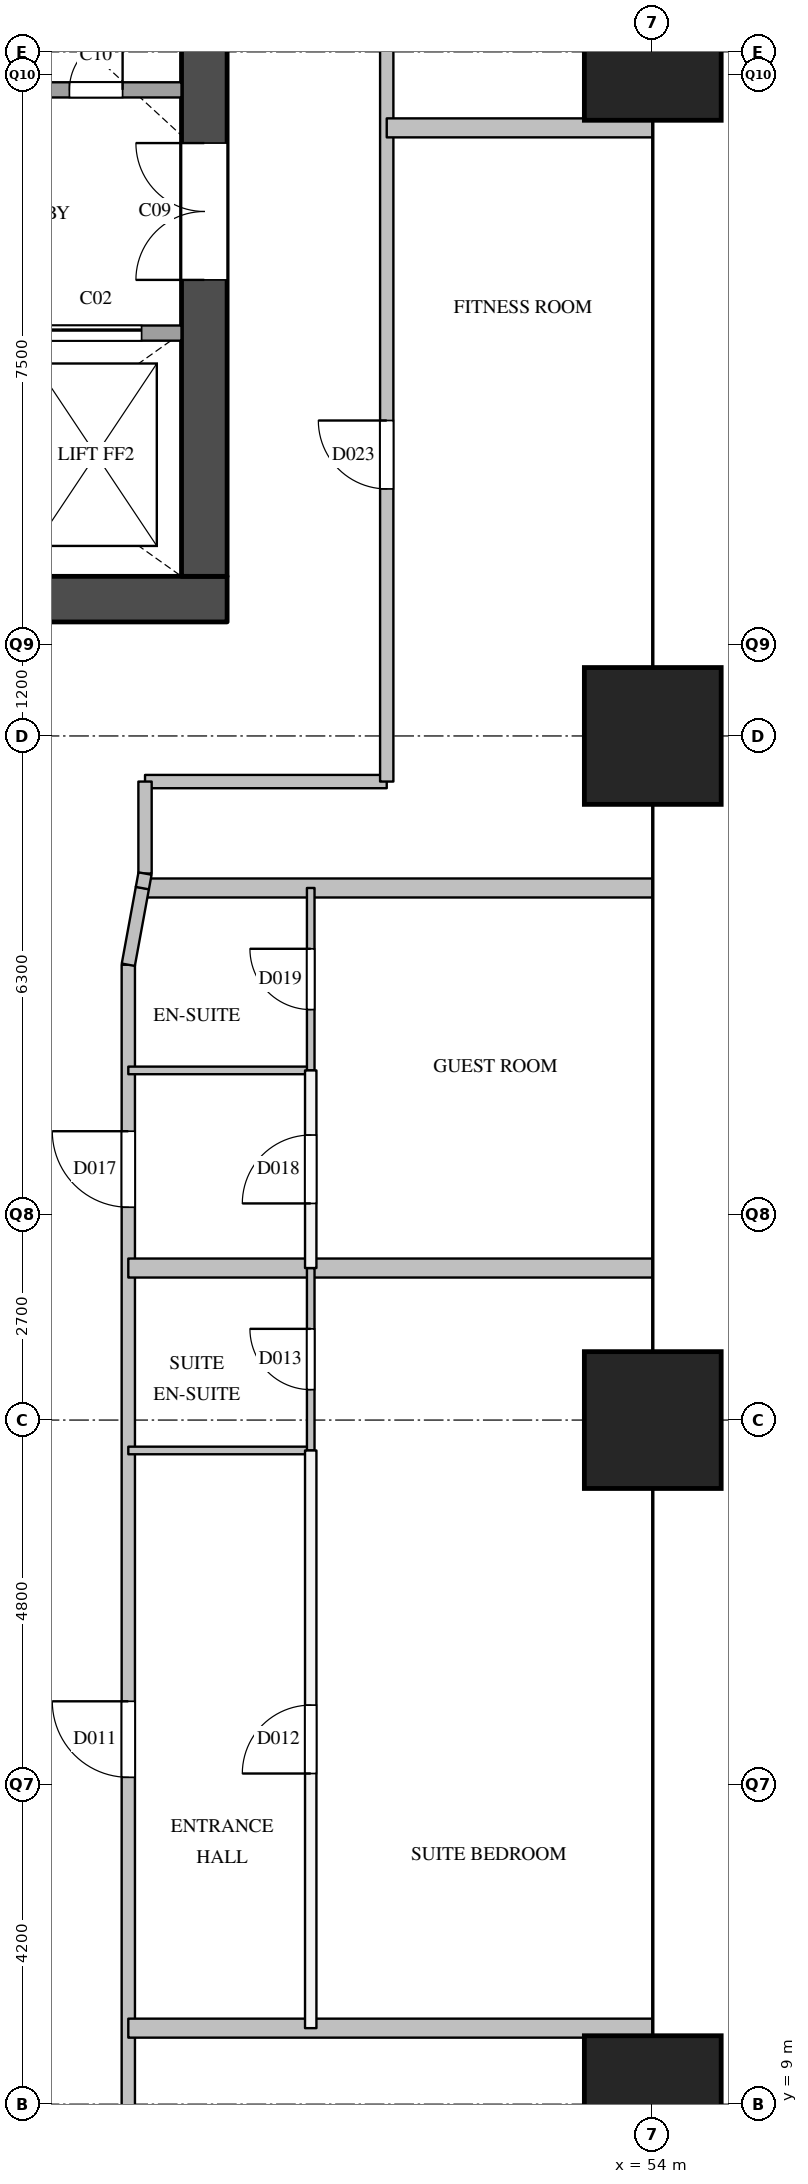
"""IFC4 building model, lengths in metres.
Left out: names, types, materials, properties, quantities, classifications, styles, units other than length and angle.
Written with IfcOpenShell. Run it as: python <this file> out.ifc"""

import sys

from ifc_helpers import new_model, si_unit, direction, frame, frame_2d, origin, origin_2d, place, context, subcontext, project, spatial, rectangle, extrude, element, fill, save


model = new_model("IFC4")
c1 = context("Model", 3, precision=1e-05, world=origin(), true_north=direction((0.0, 1.0)))
c2 = subcontext(c1, "Body", "Model", "MODEL_VIEW")
j1 = project(units=[si_unit("LENGTHUNIT", "METRE"), si_unit("PLANEANGLEUNIT", "RADIAN")], contexts=[c1])
p1 = place(None, origin())
s1 = spatial("IfcSite", under=j1, at=p1, CompositionType="ELEMENT")
p2 = place(p1, origin())
s2 = spatial("IfcBuilding", under=s1, at=p2, CompositionType="ELEMENT")
p3 = place(p2, frame((0.0, 0.0, 85.4)))
s3 = spatial("IfcBuildingStorey", under=s2, at=p3, CompositionType="ELEMENT", Elevation=85.4)
for number, where, z_axis, x_axis in (
    (1, (54.0, 9.0, 0.0), (0.0, 0.0, 1.0), (1.0, 0.0, 0.0)),
    (2, (54.0, 18.0, 0.0), (0.0, 0.0, 1.0), (1.0, 0.0, 0.0)),
    (3, (54.0, 27.0, 0.0), (0.0, 0.0, 1.0), (1.0, 0.0, 0.0)),
    (4, (54.0, 36.0, 0.0), (0.0, 0.0, 1.0), (1.0, 0.0, 0.0)),
):
    element("IfcColumn", number, at=place(p3, frame(where, z_axis=z_axis, x_axis=x_axis)), inside=s3, PredefinedType="COLUMN", context=c2, shape_type="SweptSolid", body=[
        extrude(rectangle(XDim=1.8, YDim=1.8, at=origin_2d()), origin(), (0.0, 0.0, 1.0), 3.8),
    ])
p4 = place(p3, frame((36.0, 28.8, 0.0), z_axis=(0.0, 0.0, 1.0), x_axis=(1.0, 0.0, 0.0)))
e5 = element("IfcWall", 5, at=p4, inside=s3, PredefinedType="SHEAR", context=c2, shape_type="SweptSolid", body=[
    extrude(rectangle(XDim=12.4, YDim=0.6, at=frame_2d((6.2, 0.0))), origin(), (0.0, 0.0, 1.0), 3.5),
])
p5 = place(p3, frame((48.1, 29.1, 0.0), z_axis=(0.0, 0.0, 1.0), x_axis=(0.0, 1.0, 0.0)))
e6 = element("IfcWall", 6, at=p5, inside=s3, PredefinedType="SHEAR", context=c2, shape_type="SweptSolid", body=[
    extrude(rectangle(XDim=20.3, YDim=0.6, at=frame_2d((10.15, 0.0))), origin(), (0.0, 0.0, 1.0), 3.5),
])
p6 = place(p5, frame((12.5, 0.0, 0.0)))
e7 = element("IfcOpeningElement", 7, at=p6, cuts=e6, PredefinedType="OPENING", context=c2, shape_type="SweptSolid", body=[
    extrude(rectangle(XDim=0.7, YDim=2.1, at=frame_2d((0.35, 1.05))), frame((0.0, 0.31, 0.0), z_axis=(0.0, -1.0, 0.0), x_axis=(1.0, 0.0, 0.0)), (0.0, 0.0, 1.0), 0.62),
])
p7 = place(p5, frame((3.9, 0.0, 0.0)))
e8 = element("IfcOpeningElement", 8, at=p7, cuts=e6, PredefinedType="OPENING", context=c2, shape_type="SweptSolid", body=[
    extrude(rectangle(XDim=1.8, YDim=2.1, at=frame_2d((0.9, 1.05))), frame((0.0, 0.31, 0.0), z_axis=(0.0, -1.0, 0.0), x_axis=(1.0, 0.0, 0.0)), (0.0, 0.0, 1.0), 0.62),
])
p8 = place(p3, frame((36.6, 32.3, 0.0), z_axis=(0.0, 0.0, 1.0), x_axis=(1.0, 0.0, 0.0)))
e9 = element("IfcWall", 9, at=p8, inside=s3, PredefinedType="SOLIDWALL", context=c2, shape_type="SweptSolid", body=[
    extrude(rectangle(XDim=11.2, YDim=0.2, at=frame_2d((5.6, 0.0))), origin(), (0.0, 0.0, 1.0), 3.5),
])
p9 = place(p8, frame((7.225, 0.0, 0.0)))
e10 = element("IfcOpeningElement", 10, at=p9, cuts=e9, PredefinedType="OPENING", context=c2, shape_type="SweptSolid", body=[
    extrude(rectangle(XDim=1.2, YDim=2.1, at=frame_2d((0.6, 1.05))), frame((0.0, 0.11, 0.0), z_axis=(0.0, -1.0, 0.0), x_axis=(1.0, 0.0, 0.0)), (0.0, 0.0, 1.0), 0.22),
])
p10 = place(p8, frame((9.475, 0.0, 0.0)))
e11 = element("IfcOpeningElement", 11, at=p10, cuts=e9, PredefinedType="OPENING", context=c2, shape_type="SweptSolid", body=[
    extrude(rectangle(XDim=1.2, YDim=2.1, at=frame_2d((0.6, 1.05))), frame((0.0, 0.11, 0.0), z_axis=(0.0, -1.0, 0.0), x_axis=(1.0, 0.0, 0.0)), (0.0, 0.0, 1.0), 0.22),
])
p11 = place(p3, frame((43.3, 35.5, 0.0), z_axis=(0.0, 0.0, 1.0), x_axis=(1.0, 0.0, 0.0)))
e12 = element("IfcWall", 12, at=p11, inside=s3, PredefinedType="SOLIDWALL", context=c2, shape_type="SweptSolid", body=[
    extrude(rectangle(XDim=4.5, YDim=0.2, at=frame_2d((2.25, 0.0))), origin(), (0.0, 0.0, 1.0), 3.5),
])
p12 = place(p11, frame((0.525, 0.0, 0.0)))
e13 = element("IfcOpeningElement", 13, at=p12, cuts=e12, PredefinedType="OPENING", context=c2, shape_type="SweptSolid", body=[
    extrude(rectangle(XDim=1.2, YDim=2.1, at=frame_2d((0.6, 1.05))), frame((0.0, 0.11, 0.0), z_axis=(0.0, -1.0, 0.0), x_axis=(1.0, 0.0, 0.0)), (0.0, 0.0, 1.0), 0.22),
])
p13 = place(p11, frame((3.025, 0.0, 0.0)))
e14 = element("IfcOpeningElement", 14, at=p13, cuts=e12, PredefinedType="OPENING", context=c2, shape_type="SweptSolid", body=[
    extrude(rectangle(XDim=0.7, YDim=2.1, at=frame_2d((0.35, 1.05))), frame((0.0, 0.11, 0.0), z_axis=(0.0, -1.0, 0.0), x_axis=(1.0, 0.0, 0.0)), (0.0, 0.0, 1.0), 0.22),
])
p14 = place(p3, frame((47.32, 26.4, 0.0), z_axis=(0.0, 0.0, 1.0), x_axis=(1.0, 0.0, 0.0)))
e15 = element("IfcWall", 15, at=p14, inside=s3, PredefinedType="PARTITIONING", context=c2, shape_type="SweptSolid", body=[
    extrude(rectangle(XDim=3.18, YDim=0.175, at=frame_2d((1.59, 0.0))), origin(), (0.0, 0.0, 1.0), 3.5),
])
p15 = place(p3, frame((47.1, 6.9, 0.0), z_axis=(0.0, 0.0, 1.0), x_axis=(0.0, 1.0, 0.0)))
e16 = element("IfcWall", 16, at=p15, inside=s3, PredefinedType="PARTITIONING", context=c2, shape_type="SweptSolid", body=[
    extrude(rectangle(XDim=17.09, YDim=0.175, at=frame_2d((8.545, 0.0))), origin(), (0.0, 0.0, 1.0), 3.5),
])
p16 = place(p15, frame((6.4, 0.0, 0.0)))
e17 = element("IfcOpeningElement", 17, at=p16, cuts=e16, PredefinedType="OPENING", context=c2, shape_type="SweptSolid", body=[
    extrude(rectangle(XDim=1.0, YDim=2.1, at=frame_2d((0.5, 1.05))), frame((0.0, 0.097, 0.0), z_axis=(0.0, -1.0, 0.0), x_axis=(1.0, 0.0, 0.0)), (0.0, 0.0, 1.0), 0.195),
])
p17 = place(p15, frame((13.9, 0.0, 0.0)))
e18 = element("IfcOpeningElement", 18, at=p17, cuts=e16, PredefinedType="OPENING", context=c2, shape_type="SweptSolid", body=[
    extrude(rectangle(XDim=1.0, YDim=2.1, at=frame_2d((0.5, 1.05))), frame((0.0, 0.097, 0.0), z_axis=(0.0, -1.0, 0.0), x_axis=(1.0, 0.0, 0.0)), (0.0, 0.0, 1.0), 0.195),
])
p18 = place(p3, frame((47.32, 25.19, 0.0), z_axis=(0.0, 0.0, 1.0), x_axis=(0.0, 1.0, 0.0)))
e19 = element("IfcWall", 19, at=p18, inside=s3, PredefinedType="PARTITIONING", context=c2, shape_type="SweptSolid", body=[
    extrude(rectangle(XDim=1.21, YDim=0.175, at=frame_2d((0.605, 0.0))), origin(), (0.0, 0.0, 1.0), 3.5),
])
p19 = place(p3, frame((50.5, 26.4, 0.0), z_axis=(0.0, 0.0, 1.0), x_axis=(0.0, 1.0, 0.0)))
e20 = element("IfcWall", 20, at=p19, inside=s3, PredefinedType="PARTITIONING", context=c2, shape_type="SweptSolid", body=[
    extrude(rectangle(XDim=25.7, YDim=0.175, at=frame_2d((12.85, 0.0))), origin(), (0.0, 0.0, 1.0), 2.5),
])
p20 = place(p19, frame((3.85, 0.0, 0.0)))
e21 = element("IfcOpeningElement", 21, at=p20, cuts=e20, PredefinedType="OPENING", context=c2, shape_type="SweptSolid", body=[
    extrude(rectangle(XDim=0.9, YDim=2.1, at=frame_2d((0.45, 1.05))), frame((0.0, 0.097, 0.0), z_axis=(0.0, -1.0, 0.0), x_axis=(1.0, 0.0, 0.0)), (0.0, 0.0, 1.0), 0.195),
])
p21 = place(p19, frame((13.15, 0.0, 0.0)))
e22 = element("IfcOpeningElement", 22, at=p21, cuts=e20, PredefinedType="OPENING", context=c2, shape_type="SweptSolid", body=[
    extrude(rectangle(XDim=0.9, YDim=2.1, at=frame_2d((0.45, 1.05))), frame((0.0, 0.097, 0.0), z_axis=(0.0, -1.0, 0.0), x_axis=(1.0, 0.0, 0.0)), (0.0, 0.0, 1.0), 0.195),
])
p22 = place(p19, frame((21.7, 0.0, 0.0)))
e23 = element("IfcOpeningElement", 23, at=p22, cuts=e20, PredefinedType="OPENING", context=c2, shape_type="SweptSolid", body=[
    extrude(rectangle(XDim=0.9, YDim=2.1, at=frame_2d((0.45, 1.05))), frame((0.0, 0.097, 0.0), z_axis=(0.0, -1.0, 0.0), x_axis=(1.0, 0.0, 0.0)), (0.0, 0.0, 1.0), 0.195),
])
p23 = place(p3, frame((49.5, 10.0, 0.0), z_axis=(0.0, 0.0, 1.0), x_axis=(0.0, 1.0, 0.0)))
e24 = element("IfcWall", 24, at=p23, inside=s3, PredefinedType="PARTITIONING", context=c2, shape_type="SweptSolid", body=[
    extrude(rectangle(XDim=7.6, YDim=0.15, at=frame_2d((3.8, 0.0))), origin(), (0.0, 0.0, 1.0), 3.5),
])
p24 = place(p23, frame((3.35, 0.0, 0.0)))
e25 = element("IfcOpeningElement", 25, at=p24, cuts=e24, PredefinedType="OPENING", context=c2, shape_type="SweptSolid", body=[
    extrude(rectangle(XDim=0.9, YDim=2.1, at=frame_2d((0.45, 1.05))), frame((0.0, 0.085, 0.0), z_axis=(0.0, -1.0, 0.0), x_axis=(1.0, 0.0, 0.0)), (0.0, 0.0, 1.0), 0.17),
])
p25 = place(p3, frame((49.5, 20.0, 0.0), z_axis=(0.0, 0.0, 1.0), x_axis=(0.0, 1.0, 0.0)))
e26 = element("IfcWall", 26, at=p25, inside=s3, PredefinedType="PARTITIONING", context=c2, shape_type="SweptSolid", body=[
    extrude(rectangle(XDim=2.6, YDim=0.15, at=frame_2d((1.3, 0.0))), origin(), (0.0, 0.0, 1.0), 3.5),
])
p26 = place(p25, frame((0.85, 0.0, 0.0)))
e27 = element("IfcOpeningElement", 27, at=p26, cuts=e26, PredefinedType="OPENING", context=c2, shape_type="SweptSolid", body=[
    extrude(rectangle(XDim=0.9, YDim=2.1, at=frame_2d((0.45, 1.05))), frame((0.0, 0.085, 0.0), z_axis=(0.0, -1.0, 0.0), x_axis=(1.0, 0.0, 0.0)), (0.0, 0.0, 1.0), 0.17),
])
for number, where, z_axis, x_axis in (
    (28, (47.1, 10.0, 0.0), (0.0, 0.0, 1.0), (1.0, 0.0, 0.0)),
    (29, (47.1, 20.0, 0.0), (0.0, 0.0, 1.0), (1.0, 0.0, 0.0)),
):
    element("IfcWall", number, at=place(p3, frame(where, z_axis=z_axis, x_axis=x_axis)), inside=s3, PredefinedType="PARTITIONING", context=c2, shape_type="SweptSolid", body=[
        extrude(rectangle(XDim=6.9, YDim=0.25, at=frame_2d((3.45, 0.0))), origin(), (0.0, 0.0, 1.0), 2.5),
    ])
p27 = place(p3, frame((47.303, 25.0, 0.0), z_axis=(0.0, 0.0, 1.0), x_axis=(1.0, 0.0, 0.0)))
e30 = element("IfcWall", 30, at=p27, inside=s3, PredefinedType="PARTITIONING", context=c2, shape_type="SweptSolid", body=[
    extrude(rectangle(XDim=6.697, YDim=0.25, at=frame_2d((3.348, 0.0))), origin(), (0.0, 0.0, 1.0), 2.5),
])
p28 = place(p3, frame((50.5, 35.0, 0.0), z_axis=(0.0, 0.0, 1.0), x_axis=(1.0, 0.0, 0.0)))
e31 = element("IfcWall", 31, at=p28, inside=s3, PredefinedType="PARTITIONING", context=c2, shape_type="SweptSolid", body=[
    extrude(rectangle(XDim=3.5, YDim=0.25, at=frame_2d((1.75, 0.0))), origin(), (0.0, 0.0, 1.0), 2.5),
])
for number, where, z_axis, x_axis in (
    (32, (47.1, 17.6, 0.0), (0.0, 0.0, 1.0), (1.0, 0.0, 0.0)),
    (33, (47.1, 22.6, 0.0), (0.0, 0.0, 1.0), (1.0, 0.0, 0.0)),
):
    element("IfcWall", number, at=place(p3, frame(where, z_axis=z_axis, x_axis=x_axis)), inside=s3, PredefinedType="PARTITIONING", context=c2, shape_type="SweptSolid", body=[
        extrude(rectangle(XDim=2.4, YDim=0.1, at=frame_2d((1.2, 0.0))), origin(), (0.0, 0.0, 1.0), 3.5),
    ])
p29 = place(p3, frame((49.5, 17.6, 0.0), z_axis=(0.0, 0.0, 1.0), x_axis=(0.0, 1.0, 0.0)))
e34 = element("IfcWall", 34, at=p29, inside=s3, PredefinedType="PARTITIONING", context=c2, shape_type="SweptSolid", body=[
    extrude(rectangle(XDim=2.4, YDim=0.1, at=frame_2d((1.2, 0.0))), origin(), (0.0, 0.0, 1.0), 3.5),
])
p30 = place(p29, frame((0.8, 0.0, 0.0)))
e35 = element("IfcOpeningElement", 35, at=p30, cuts=e34, PredefinedType="OPENING", context=c2, shape_type="SweptSolid", body=[
    extrude(rectangle(XDim=0.8, YDim=2.1, at=frame_2d((0.4, 1.05))), frame((0.0, 0.06, 0.0), z_axis=(0.0, -1.0, 0.0), x_axis=(1.0, 0.0, 0.0)), (0.0, 0.0, 1.0), 0.12),
])
p31 = place(p3, frame((49.5, 22.6, 0.0), z_axis=(0.0, 0.0, 1.0), x_axis=(0.0, 1.0, 0.0)))
e36 = element("IfcWall", 36, at=p31, inside=s3, PredefinedType="PARTITIONING", context=c2, shape_type="SweptSolid", body=[
    extrude(rectangle(XDim=2.4, YDim=0.1, at=frame_2d((1.2, 0.0))), origin(), (0.0, 0.0, 1.0), 3.5),
])
p32 = place(p31, frame((0.8, 0.0, 0.0)))
e37 = element("IfcOpeningElement", 37, at=p32, cuts=e36, PredefinedType="OPENING", context=c2, shape_type="SweptSolid", body=[
    extrude(rectangle(XDim=0.8, YDim=2.1, at=frame_2d((0.4, 1.05))), frame((0.0, 0.06, 0.0), z_axis=(0.0, -1.0, 0.0), x_axis=(1.0, 0.0, 0.0)), (0.0, 0.0, 1.0), 0.12),
])
p33 = place(p3, frame((47.285, 25.002, 0.0), z_axis=(0.0, 0.0, 1.0), x_axis=(-0.180117405398, -0.983645119071, 0.0)))
e38 = element("IfcWall", 38, at=p33, inside=s3, PredefinedType="PARTITIONING", context=c2, shape_type="SweptSolid", body=[
    extrude(rectangle(XDim=1.029, YDim=0.175, at=frame_2d((0.514, 0.0))), origin(), (0.0, 0.0, 1.0), 3.5),
])
p34 = place(p3, frame((47.32, 25.19, 0.0), z_axis=(0.0, 0.0, 1.0), x_axis=(-0.180206793317, -0.983628746856, 0.0)))
e39 = element("IfcWall", 39, at=p34, inside=s3, PredefinedType="PARTITIONING", context=c2, shape_type="SweptSolid", body=[
    extrude(rectangle(XDim=0.195, YDim=0.175, at=frame_2d((0.098, 0.0))), origin(), (0.0, 0.0, 1.0), 3.5),
])
p35 = place(p10, origin())
e40 = element("IfcDoor", 40, at=p35, inside=s3, OperationType="SLIDING_TO_LEFT", PredefinedType="DOOR", context=c2, shape_type="SweptSolid", body=[
    extrude(rectangle(XDim=1.2, YDim=2.1, at=frame_2d((0.6, 1.05))), frame((0.0, 0.025, 0.0), z_axis=(0.0, -1.0, 0.0), x_axis=(1.0, 0.0, 0.0)), (0.0, 0.0, 1.0), 0.05),
])
fill(e11, e40)
p36 = place(p7, origin())
e41 = element("IfcDoor", 41, at=p36, inside=s3, OperationType="DOUBLE_DOOR_SINGLE_SWING", PredefinedType="DOOR", context=c2, shape_type="SweptSolid", body=[
    extrude(rectangle(XDim=1.8, YDim=2.1, at=frame_2d((0.9, 1.05))), frame((0.0, 0.025, 0.0), z_axis=(0.0, -1.0, 0.0), x_axis=(1.0, 0.0, 0.0)), (0.0, 0.0, 1.0), 0.05),
])
fill(e8, e41)
p37 = place(p13, origin())
e42 = element("IfcDoor", 42, at=p37, inside=s3, OperationType="SINGLE_SWING_RIGHT", PredefinedType="DOOR", context=c2, shape_type="SweptSolid", body=[
    extrude(rectangle(XDim=0.7, YDim=2.1, at=frame_2d((0.35, 1.05))), frame((0.0, 0.025, 0.0), z_axis=(0.0, -1.0, 0.0), x_axis=(1.0, 0.0, 0.0)), (0.0, 0.0, 1.0), 0.05),
])
fill(e14, e42)
p38 = place(p16, origin())
e43 = element("IfcDoor", 43, at=p38, inside=s3, OperationType="SINGLE_SWING_RIGHT", PredefinedType="DOOR", context=c2, shape_type="SweptSolid", body=[
    extrude(rectangle(XDim=1.0, YDim=2.1, at=frame_2d((0.5, 1.05))), frame((0.0, 0.025, 0.0), z_axis=(0.0, -1.0, 0.0), x_axis=(1.0, 0.0, 0.0)), (0.0, 0.0, 1.0), 0.05),
])
fill(e17, e43)
p39 = place(p24, origin())
e44 = element("IfcDoor", 44, at=p39, inside=s3, OperationType="SINGLE_SWING_LEFT", PredefinedType="DOOR", context=c2, shape_type="SweptSolid", body=[
    extrude(rectangle(XDim=0.9, YDim=2.1, at=frame_2d((0.45, 1.05))), frame((0.0, 0.025, 0.0), z_axis=(0.0, -1.0, 0.0), x_axis=(1.0, 0.0, 0.0)), (0.0, 0.0, 1.0), 0.05),
])
fill(e25, e44)
p40 = place(p30, origin())
e45 = element("IfcDoor", 45, at=p40, inside=s3, OperationType="SINGLE_SWING_RIGHT", PredefinedType="DOOR", context=c2, shape_type="SweptSolid", body=[
    extrude(rectangle(XDim=0.8, YDim=2.1, at=frame_2d((0.4, 1.05))), frame((0.0, 0.025, 0.0), z_axis=(0.0, -1.0, 0.0), x_axis=(1.0, 0.0, 0.0)), (0.0, 0.0, 1.0), 0.05),
])
fill(e35, e45)
p41 = place(p17, origin())
e46 = element("IfcDoor", 46, at=p41, inside=s3, OperationType="SINGLE_SWING_RIGHT", PredefinedType="DOOR", context=c2, shape_type="SweptSolid", body=[
    extrude(rectangle(XDim=1.0, YDim=2.1, at=frame_2d((0.5, 1.05))), frame((0.0, 0.025, 0.0), z_axis=(0.0, -1.0, 0.0), x_axis=(1.0, 0.0, 0.0)), (0.0, 0.0, 1.0), 0.05),
])
fill(e18, e46)
p42 = place(p26, origin())
e47 = element("IfcDoor", 47, at=p42, inside=s3, OperationType="SINGLE_SWING_LEFT", PredefinedType="DOOR", context=c2, shape_type="SweptSolid", body=[
    extrude(rectangle(XDim=0.9, YDim=2.1, at=frame_2d((0.45, 1.05))), frame((0.0, 0.025, 0.0), z_axis=(0.0, -1.0, 0.0), x_axis=(1.0, 0.0, 0.0)), (0.0, 0.0, 1.0), 0.05),
])
fill(e27, e47)
p43 = place(p32, origin())
e48 = element("IfcDoor", 48, at=p43, inside=s3, OperationType="SINGLE_SWING_RIGHT", PredefinedType="DOOR", context=c2, shape_type="SweptSolid", body=[
    extrude(rectangle(XDim=0.8, YDim=2.1, at=frame_2d((0.4, 1.05))), frame((0.0, 0.025, 0.0), z_axis=(0.0, -1.0, 0.0), x_axis=(1.0, 0.0, 0.0)), (0.0, 0.0, 1.0), 0.05),
])
fill(e37, e48)
p44 = place(p20, origin())
e49 = element("IfcDoor", 49, at=p44, inside=s3, OperationType="SINGLE_SWING_RIGHT", PredefinedType="DOOR", context=c2, shape_type="SweptSolid", body=[
    extrude(rectangle(XDim=0.9, YDim=2.1, at=frame_2d((0.45, 1.05))), frame((0.0, 0.025, 0.0), z_axis=(0.0, -1.0, 0.0), x_axis=(1.0, 0.0, 0.0)), (0.0, 0.0, 1.0), 0.05),
])
fill(e21, e49)
save(model, sys.argv[1])
